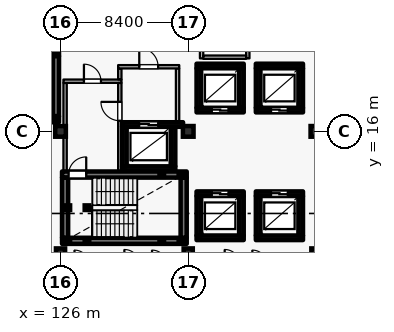
"""IFC4 building model, lengths in metres.
Left out: names, types, materials, properties, quantities, classifications, styles, units other than length and angle.
Written with IfcOpenShell. Run it as: python <this file> out.ifc"""

import sys

from ifc_helpers import new_model, si_unit, direction, frame, frame_2d, origin, origin_2d, place, context, subcontext, project, spatial, rectangle, hollow_rectangle, extrude, element, fill, save


model = new_model("IFC4")
c1 = context("Model", 3, precision=1e-05, world=origin(), true_north=direction((0.0, 1.0)))
c2 = subcontext(c1, "Body", "Model", "MODEL_VIEW")
j1 = project(units=[si_unit("LENGTHUNIT", "METRE"), si_unit("PLANEANGLEUNIT", "RADIAN")], contexts=[c1])
p1 = place(None, origin())
s1 = spatial("IfcSite", under=j1, at=p1, CompositionType="ELEMENT")
p2 = place(p1, origin())
s2 = spatial("IfcBuilding", under=s1, at=p2, CompositionType="ELEMENT")
p3 = place(p2, frame((0.0, 0.0, 32.4)))
s3 = spatial("IfcBuildingStorey", under=s2, at=p3, CompositionType="ELEMENT", Elevation=32.4)
for number, where, z_axis, x_axis in (
    (1, (126.0, 16.0, 0.0), (0.0, 0.0, 1.0), (1.0, 0.0, 0.0)),
    (2, (134.4, 16.0, 0.0), (0.0, 0.0, 1.0), (1.0, 0.0, 0.0)),
    (3, (142.8, 16.0, 0.0), (0.0, 0.0, 1.0), (1.0, 0.0, 0.0)),
):
    element("IfcColumn", number, at=place(p3, frame(where, z_axis=z_axis, x_axis=x_axis)), inside=s3, PredefinedType="COLUMN", context=c2, shape_type="SweptSolid", body=[
        extrude(rectangle(XDim=0.7, YDim=0.7, at=origin_2d()), origin(), (0.0, 0.0, 1.0), 3.6),
    ])
for number, where, z_axis, x_axis in (
    (4, (126.0, 8.0, 0.0), (0.0, 0.0, 1.0), (1.0, 0.0, 0.0)),
    (5, (134.4, 8.0, 0.0), (0.0, 0.0, 1.0), (1.0, 0.0, 0.0)),
    (6, (142.8, 8.0, 0.0), (0.0, 0.0, 1.0), (1.0, 0.0, 0.0)),
):
    element("IfcColumn", number, at=place(p3, frame(where, z_axis=z_axis, x_axis=x_axis)), inside=s3, PredefinedType="COLUMN", context=c2, shape_type="SweptSolid", body=[
        extrude(rectangle(XDim=0.6, YDim=0.6, at=origin_2d()), origin(), (0.0, 0.0, 1.0), 3.6),
    ])
p4 = place(p3, frame((134.95, 17.4, 0.0), z_axis=(0.0, 0.0, 1.0), x_axis=(1.0, 0.0, 0.0)))
e7 = element("IfcWall", 7, at=p4, inside=s3, PredefinedType="SHEAR", context=c2, shape_type="SweptSolid", body=[
    extrude(rectangle(XDim=3.1, YDim=0.3, at=frame_2d((1.55, 0.0))), origin(), (0.0, 0.0, 1.0), 3.335),
])
p5 = place(p4, frame((1.0, 0.0, 0.0)))
e8 = element("IfcOpeningElement", 8, at=p5, cuts=e7, PredefinedType="OPENING", context=c2, shape_type="SweptSolid", body=[
    extrude(rectangle(XDim=1.1, YDim=2.2, at=frame_2d((0.55, 1.1))), frame((0.0, 0.16, 0.0), z_axis=(0.0, -1.0, 0.0), x_axis=(1.0, 0.0, 0.0)), (0.0, 0.0, 1.0), 0.32),
])
p6 = place(p3, frame((137.9, 17.555, 0.0), z_axis=(0.0, 0.0, 1.0), x_axis=(0.0, 1.0, 0.0)))
e9 = element("IfcWall", 9, at=p6, inside=s3, PredefinedType="SHEAR", context=c2, shape_type="SweptSolid", body=[
    extrude(rectangle(XDim=2.59, YDim=0.3, at=frame_2d((1.295, 0.0))), origin(), (0.0, 0.0, 1.0), 3.335),
])
p7 = place(p3, frame((138.05, 20.3, 0.0), z_axis=(0.0, 0.0, 1.0), x_axis=(-1.0, 0.0, 0.0)))
e10 = element("IfcWall", 10, at=p7, inside=s3, PredefinedType="SHEAR", context=c2, shape_type="SweptSolid", body=[
    extrude(rectangle(XDim=3.1, YDim=0.3, at=frame_2d((1.55, 0.0))), origin(), (0.0, 0.0, 1.0), 3.335),
])
p8 = place(p3, frame((135.1, 20.145, 0.0), z_axis=(0.0, 0.0, 1.0), x_axis=(0.0, -1.0, 0.0)))
e11 = element("IfcWall", 11, at=p8, inside=s3, PredefinedType="SHEAR", context=c2, shape_type="SweptSolid", body=[
    extrude(rectangle(XDim=2.59, YDim=0.3, at=frame_2d((1.295, 0.0))), origin(), (0.0, 0.0, 1.0), 3.335),
])
p9 = place(p3, frame((138.85, 17.4, 0.0), z_axis=(0.0, 0.0, 1.0), x_axis=(1.0, 0.0, 0.0)))
e12 = element("IfcWall", 12, at=p9, inside=s3, PredefinedType="SHEAR", context=c2, shape_type="SweptSolid", body=[
    extrude(rectangle(XDim=3.1, YDim=0.3, at=frame_2d((1.55, 0.0))), origin(), (0.0, 0.0, 1.0), 3.335),
])
p10 = place(p9, frame((1.0, 0.0, 0.0)))
e13 = element("IfcOpeningElement", 13, at=p10, cuts=e12, PredefinedType="OPENING", context=c2, shape_type="SweptSolid", body=[
    extrude(rectangle(XDim=1.1, YDim=2.2, at=frame_2d((0.55, 1.1))), frame((0.0, 0.16, 0.0), z_axis=(0.0, -1.0, 0.0), x_axis=(1.0, 0.0, 0.0)), (0.0, 0.0, 1.0), 0.32),
])
p11 = place(p3, frame((141.8, 17.555, 0.0), z_axis=(0.0, 0.0, 1.0), x_axis=(0.0, 1.0, 0.0)))
e14 = element("IfcWall", 14, at=p11, inside=s3, PredefinedType="SHEAR", context=c2, shape_type="SweptSolid", body=[
    extrude(rectangle(XDim=2.59, YDim=0.3, at=frame_2d((1.295, 0.0))), origin(), (0.0, 0.0, 1.0), 3.335),
])
p12 = place(p3, frame((141.95, 20.3, 0.0), z_axis=(0.0, 0.0, 1.0), x_axis=(-1.0, 0.0, 0.0)))
e15 = element("IfcWall", 15, at=p12, inside=s3, PredefinedType="SHEAR", context=c2, shape_type="SweptSolid", body=[
    extrude(rectangle(XDim=3.1, YDim=0.3, at=frame_2d((1.55, 0.0))), origin(), (0.0, 0.0, 1.0), 3.335),
])
p13 = place(p3, frame((139.0, 20.145, 0.0), z_axis=(0.0, 0.0, 1.0), x_axis=(0.0, -1.0, 0.0)))
e16 = element("IfcWall", 16, at=p13, inside=s3, PredefinedType="SHEAR", context=c2, shape_type="SweptSolid", body=[
    extrude(rectangle(XDim=2.59, YDim=0.3, at=frame_2d((1.295, 0.0))), origin(), (0.0, 0.0, 1.0), 3.335),
])
p14 = place(p3, frame((134.95, 9.0, 0.0), z_axis=(0.0, 0.0, 1.0), x_axis=(1.0, 0.0, 0.0)))
e17 = element("IfcWall", 17, at=p14, inside=s3, PredefinedType="SHEAR", context=c2, shape_type="SweptSolid", body=[
    extrude(rectangle(XDim=3.1, YDim=0.3, at=frame_2d((1.55, 0.0))), origin(), (0.0, 0.0, 1.0), 3.335),
])
p15 = place(p3, frame((137.9, 9.155, 0.0), z_axis=(0.0, 0.0, 1.0), x_axis=(0.0, 1.0, 0.0)))
e18 = element("IfcWall", 18, at=p15, inside=s3, PredefinedType="SHEAR", context=c2, shape_type="SweptSolid", body=[
    extrude(rectangle(XDim=2.59, YDim=0.3, at=frame_2d((1.295, 0.0))), origin(), (0.0, 0.0, 1.0), 3.335),
])
p16 = place(p3, frame((138.05, 11.9, 0.0), z_axis=(0.0, 0.0, 1.0), x_axis=(-1.0, 0.0, 0.0)))
e19 = element("IfcWall", 19, at=p16, inside=s3, PredefinedType="SHEAR", context=c2, shape_type="SweptSolid", body=[
    extrude(rectangle(XDim=3.1, YDim=0.3, at=frame_2d((1.55, 0.0))), origin(), (0.0, 0.0, 1.0), 3.335),
])
p17 = place(p16, frame((1.0, 0.0, 0.0)))
e20 = element("IfcOpeningElement", 20, at=p17, cuts=e19, PredefinedType="OPENING", context=c2, shape_type="SweptSolid", body=[
    extrude(rectangle(XDim=1.1, YDim=2.2, at=frame_2d((0.55, 1.1))), frame((0.0, 0.16, 0.0), z_axis=(0.0, -1.0, 0.0), x_axis=(1.0, 0.0, 0.0)), (0.0, 0.0, 1.0), 0.32),
])
p18 = place(p3, frame((135.1, 11.745, 0.0), z_axis=(0.0, 0.0, 1.0), x_axis=(0.0, -1.0, 0.0)))
e21 = element("IfcWall", 21, at=p18, inside=s3, PredefinedType="SHEAR", context=c2, shape_type="SweptSolid", body=[
    extrude(rectangle(XDim=2.59, YDim=0.3, at=frame_2d((1.295, 0.0))), origin(), (0.0, 0.0, 1.0), 3.335),
])
p19 = place(p3, frame((138.85, 9.0, 0.0), z_axis=(0.0, 0.0, 1.0), x_axis=(1.0, 0.0, 0.0)))
e22 = element("IfcWall", 22, at=p19, inside=s3, PredefinedType="SHEAR", context=c2, shape_type="SweptSolid", body=[
    extrude(rectangle(XDim=3.1, YDim=0.3, at=frame_2d((1.55, 0.0))), origin(), (0.0, 0.0, 1.0), 3.335),
])
p20 = place(p3, frame((141.8, 9.155, 0.0), z_axis=(0.0, 0.0, 1.0), x_axis=(0.0, 1.0, 0.0)))
e23 = element("IfcWall", 23, at=p20, inside=s3, PredefinedType="SHEAR", context=c2, shape_type="SweptSolid", body=[
    extrude(rectangle(XDim=2.59, YDim=0.3, at=frame_2d((1.295, 0.0))), origin(), (0.0, 0.0, 1.0), 3.335),
])
p21 = place(p3, frame((141.95, 11.9, 0.0), z_axis=(0.0, 0.0, 1.0), x_axis=(-1.0, 0.0, 0.0)))
e24 = element("IfcWall", 24, at=p21, inside=s3, PredefinedType="SHEAR", context=c2, shape_type="SweptSolid", body=[
    extrude(rectangle(XDim=3.1, YDim=0.3, at=frame_2d((1.55, 0.0))), origin(), (0.0, 0.0, 1.0), 3.335),
])
p22 = place(p21, frame((1.0, 0.0, 0.0)))
e25 = element("IfcOpeningElement", 25, at=p22, cuts=e24, PredefinedType="OPENING", context=c2, shape_type="SweptSolid", body=[
    extrude(rectangle(XDim=1.1, YDim=2.2, at=frame_2d((0.55, 1.1))), frame((0.0, 0.16, 0.0), z_axis=(0.0, -1.0, 0.0), x_axis=(1.0, 0.0, 0.0)), (0.0, 0.0, 1.0), 0.32),
])
p23 = place(p3, frame((139.0, 11.745, 0.0), z_axis=(0.0, 0.0, 1.0), x_axis=(0.0, -1.0, 0.0)))
e26 = element("IfcWall", 26, at=p23, inside=s3, PredefinedType="SHEAR", context=c2, shape_type="SweptSolid", body=[
    extrude(rectangle(XDim=2.59, YDim=0.3, at=frame_2d((1.295, 0.0))), origin(), (0.0, 0.0, 1.0), 3.335),
])
p24 = place(p3, frame((130.05, 13.55, 0.0), z_axis=(0.0, 0.0, 1.0), x_axis=(1.0, 0.0, 0.0)))
e27 = element("IfcWall", 27, at=p24, inside=s3, PredefinedType="SHEAR", context=c2, shape_type="SweptSolid", body=[
    extrude(rectangle(XDim=3.5, YDim=0.3, at=frame_2d((1.75, 0.0))), origin(), (0.0, 0.0, 1.0), 3.335),
])
p25 = place(p3, frame((133.4, 13.705, 0.0), z_axis=(0.0, 0.0, 1.0), x_axis=(0.0, 1.0, 0.0)))
e28 = element("IfcWall", 28, at=p25, inside=s3, PredefinedType="SHEAR", context=c2, shape_type="SweptSolid", body=[
    extrude(rectangle(XDim=2.59, YDim=0.3, at=frame_2d((1.295, 0.0))), origin(), (0.0, 0.0, 1.0), 3.335),
])
p26 = place(p3, frame((134.06, 16.45, 0.0), z_axis=(0.0, 0.0, 1.0), x_axis=(-1.0, 0.0, 0.0)))
e29 = element("IfcWall", 29, at=p26, inside=s3, PredefinedType="SHEAR", context=c2, shape_type="SweptSolid", body=[
    extrude(rectangle(XDim=4.01, YDim=0.3, at=frame_2d((2.005, 0.0))), origin(), (0.0, 0.0, 1.0), 3.335),
])
p27 = place(p26, frame((1.635, 0.0, 0.0)))
e30 = element("IfcOpeningElement", 30, at=p27, cuts=e29, PredefinedType="OPENING", context=c2, shape_type="SweptSolid", body=[
    extrude(rectangle(XDim=1.25, YDim=2.25, at=frame_2d((0.625, 1.125))), frame((0.0, 0.16, 0.0), z_axis=(0.0, -1.0, 0.0), x_axis=(1.0, 0.0, 0.0)), (0.0, 0.0, 1.0), 0.32),
])
p28 = place(p3, frame((130.2, 16.295, 0.0), z_axis=(0.0, 0.0, 1.0), x_axis=(0.0, -1.0, 0.0)))
e31 = element("IfcWall", 31, at=p28, inside=s3, PredefinedType="SHEAR", context=c2, shape_type="SweptSolid", body=[
    extrude(rectangle(XDim=2.59, YDim=0.3, at=frame_2d((1.295, 0.0))), origin(), (0.0, 0.0, 1.0), 3.335),
])
p29 = place(p3, frame((126.1, 8.8, 0.0), z_axis=(0.0, 0.0, 1.0), x_axis=(1.0, 0.0, 0.0)))
e32 = element("IfcWall", 32, at=p29, inside=s3, PredefinedType="SHEAR", context=c2, shape_type="SweptSolid", body=[
    extrude(rectangle(XDim=8.2, YDim=0.4, at=frame_2d((4.1, 0.0))), origin(), (0.0, 0.0, 1.0), 3.335),
])
p30 = place(p3, frame((134.1, 9.005, 0.0), z_axis=(0.0, 0.0, 1.0), x_axis=(0.0, 1.0, 0.0)))
e33 = element("IfcWall", 33, at=p30, inside=s3, PredefinedType="SHEAR", context=c2, shape_type="SweptSolid", body=[
    extrude(rectangle(XDim=3.95, YDim=0.4, at=frame_2d((1.975, 0.0))), origin(), (0.0, 0.0, 1.0), 3.335),
])
p31 = place(p3, frame((126.1, 13.16, 0.0), z_axis=(0.0, 0.0, 1.0), x_axis=(1.0, 0.0, 0.0)))
e34 = element("IfcWall", 34, at=p31, inside=s3, PredefinedType="SHEAR", context=c2, shape_type="SweptSolid", body=[
    extrude(rectangle(XDim=8.2, YDim=0.4, at=frame_2d((4.1, 0.0))), origin(), (0.0, 0.0, 1.0), 3.335),
])
p32 = place(p31, frame((0.43, 0.0, 0.0)))
e35 = element("IfcOpeningElement", 35, at=p32, cuts=e34, PredefinedType="OPENING", context=c2, shape_type="SweptSolid", body=[
    extrude(rectangle(XDim=1.16, YDim=2.2, at=frame_2d((0.58, 1.1))), frame((0.0, 0.21, 0.0), z_axis=(0.0, -1.0, 0.0), x_axis=(1.0, 0.0, 0.0)), (0.0, 0.0, 1.0), 0.42),
])
p33 = place(p3, frame((126.3, 9.005, 0.0), z_axis=(0.0, 0.0, 1.0), x_axis=(0.0, 1.0, 0.0)))
e36 = element("IfcWall", 36, at=p33, inside=s3, PredefinedType="SHEAR", context=c2, shape_type="SweptSolid", body=[
    extrude(rectangle(XDim=3.95, YDim=0.4, at=frame_2d((1.975, 0.0))), origin(), (0.0, 0.0, 1.0), 3.335),
])
p34 = place(p3, frame((126.3, 13.365, 0.0), z_axis=(0.0, 0.0, 1.0), x_axis=(0.0, 1.0, 0.0)))
e37 = element("IfcWall", 37, at=p34, inside=s3, PredefinedType="PARTITIONING", context=c2, shape_type="SweptSolid", body=[
    extrude(rectangle(XDim=5.82, YDim=0.22, at=frame_2d((2.91, 0.0))), origin(), (0.0, 0.0, 1.0), 3.335),
])
p35 = place(p3, frame((126.19, 19.3, 0.0), z_axis=(0.0, 0.0, 1.0), x_axis=(1.0, 0.0, 0.0)))
e38 = element("IfcWall", 38, at=p35, inside=s3, PredefinedType="PARTITIONING", context=c2, shape_type="SweptSolid", body=[
    extrude(rectangle(XDim=3.82, YDim=0.22, at=frame_2d((1.91, 0.0))), origin(), (0.0, 0.0, 1.0), 3.335),
])
p36 = place(p35, frame((1.35, 0.0, 0.0)))
e39 = element("IfcOpeningElement", 39, at=p36, cuts=e38, PredefinedType="OPENING", context=c2, shape_type="SweptSolid", body=[
    extrude(rectangle(XDim=1.12, YDim=2.2, at=frame_2d((0.56, 1.1))), frame((0.0, 0.12, 0.0), z_axis=(0.0, -1.0, 0.0), x_axis=(1.0, 0.0, 0.0)), (0.0, 0.0, 1.0), 0.24),
])
p37 = place(p3, frame((129.9, 13.365, 0.0), z_axis=(0.0, 0.0, 1.0), x_axis=(0.0, 1.0, 0.0)))
e40 = element("IfcWall", 40, at=p37, inside=s3, PredefinedType="PARTITIONING", context=c2, shape_type="SweptSolid", body=[
    extrude(rectangle(XDim=5.82, YDim=0.22, at=frame_2d((2.91, 0.0))), origin(), (0.0, 0.0, 1.0), 3.335),
])
p38 = place(p37, frame((3.335, 0.0, 0.0)))
e41 = element("IfcOpeningElement", 41, at=p38, cuts=e40, PredefinedType="OPENING", context=c2, shape_type="SweptSolid", body=[
    extrude(rectangle(XDim=1.24, YDim=2.2, at=frame_2d((0.62, 1.1))), frame((0.0, 0.12, 0.0), z_axis=(0.0, -1.0, 0.0), x_axis=(1.0, 0.0, 0.0)), (0.0, 0.0, 1.0), 0.24),
])
p39 = place(p3, frame((129.9, 19.415, 0.0), z_axis=(0.0, 0.0, 1.0), x_axis=(0.0, 1.0, 0.0)))
e42 = element("IfcWall", 42, at=p39, inside=s3, PredefinedType="PARTITIONING", context=c2, shape_type="SweptSolid", body=[
    extrude(rectangle(XDim=0.72, YDim=0.22, at=frame_2d((0.36, 0.0))), origin(), (0.0, 0.0, 1.0), 3.335),
])
p40 = place(p3, frame((133.7, 16.605, 0.0), z_axis=(0.0, 0.0, 1.0), x_axis=(0.0, 1.0, 0.0)))
e43 = element("IfcWall", 43, at=p40, inside=s3, PredefinedType="PARTITIONING", context=c2, shape_type="SweptSolid", body=[
    extrude(rectangle(XDim=3.53, YDim=0.22, at=frame_2d((1.765, 0.0))), origin(), (0.0, 0.0, 1.0), 3.335),
])
p41 = place(p3, frame((129.79, 20.25, 0.0), z_axis=(0.0, 0.0, 1.0), x_axis=(1.0, 0.0, 0.0)))
e44 = element("IfcWall", 44, at=p41, inside=s3, PredefinedType="PARTITIONING", context=c2, shape_type="SweptSolid", body=[
    extrude(rectangle(XDim=4.02, YDim=0.22, at=frame_2d((2.01, 0.0))), origin(), (0.0, 0.0, 1.0), 3.335),
])
p42 = place(p41, frame((1.39, 0.0, 0.0)))
e45 = element("IfcOpeningElement", 45, at=p42, cuts=e44, PredefinedType="OPENING", context=c2, shape_type="SweptSolid", body=[
    extrude(rectangle(XDim=1.24, YDim=2.2, at=frame_2d((0.62, 1.1))), frame((0.0, 0.12, 0.0), z_axis=(0.0, -1.0, 0.0), x_axis=(1.0, 0.0, 0.0)), (0.0, 0.0, 1.0), 0.24),
])
for number, where, z_axis, x_axis in (
    (46, (126.48, 8.8, 0.0), (0.0, 0.0, 1.0), (1.0, 0.0, 0.0)),
    (47, (126.48, 10.98, 0.0), (0.0, 0.0, 1.0), (1.0, 0.0, 0.0)),
    (48, (127.74, 8.8, 0.0), (0.0, 0.0, 1.0), (1.0, 0.0, 0.0)),
    (49, (127.74, 10.98, 0.0), (0.0, 0.0, 1.0), (1.0, 0.0, 0.0)),
):
    element("IfcColumn", number, at=place(p3, frame(where, z_axis=z_axis, x_axis=x_axis)), inside=s3, PredefinedType="COLUMN", context=c2, shape_type="SweptSolid", body=[
        extrude(hollow_rectangle(XDim=0.3, YDim=0.3, WallThickness=0.012, at=origin_2d()), origin(), (0.0, 0.0, 1.0), 3.42),
    ])
for number, where, z_axis, x_axis in (
    (50, (132.66, 8.8, -1.8), (0.0, 0.0, 1.0), (1.0, 0.0, 0.0)),
    (51, (132.66, 13.16, -1.8), (0.0, 0.0, 1.0), (1.0, 0.0, 0.0)),
    (52, (133.92, 8.8, -1.8), (0.0, 0.0, 1.0), (1.0, 0.0, 0.0)),
    (53, (133.92, 13.16, -1.8), (0.0, 0.0, 1.0), (1.0, 0.0, 0.0)),
):
    element("IfcColumn", number, at=place(p3, frame(where, z_axis=z_axis, x_axis=x_axis)), inside=s3, PredefinedType="COLUMN", context=c2, shape_type="SweptSolid", body=[
        extrude(hollow_rectangle(XDim=0.3, YDim=0.3, WallThickness=0.012, at=origin_2d()), origin(), (0.0, 0.0, 1.0), 3.42),
    ])
p43 = place(p3, frame((117.75, 16.8, 0.0), z_axis=(0.0, 0.0, 1.0), x_axis=(1.0, 0.0, 0.0)))
e54 = element("IfcWall", 54, at=p43, inside=s3, PredefinedType="SHEAR", context=c2, shape_type="SweptSolid", body=[
    extrude(rectangle(XDim=8.15, YDim=0.4, at=frame_2d((4.075, 0.0))), origin(), (0.0, 0.0, 1.0), 3.335),
])
p44 = place(p3, frame((125.7, 17.005, 0.0), z_axis=(0.0, 0.0, 1.0), x_axis=(0.0, 1.0, 0.0)))
e55 = element("IfcWall", 55, at=p44, inside=s3, PredefinedType="SHEAR", context=c2, shape_type="SweptSolid", body=[
    extrude(rectangle(XDim=3.95, YDim=0.4, at=frame_2d((1.975, 0.0))), origin(), (0.0, 0.0, 1.0), 3.335),
])
p45 = place(p3, frame((117.75, 21.16, 0.0), z_axis=(0.0, 0.0, 1.0), x_axis=(1.0, 0.0, 0.0)))
e56 = element("IfcWall", 56, at=p45, inside=s3, PredefinedType="SHEAR", context=c2, shape_type="SweptSolid", body=[
    extrude(rectangle(XDim=8.15, YDim=0.4, at=frame_2d((4.075, 0.0))), origin(), (0.0, 0.0, 1.0), 3.335),
])
p46 = place(p45, frame((0.38, 0.0, 0.0)))
e57 = element("IfcOpeningElement", 57, at=p46, cuts=e56, PredefinedType="OPENING", context=c2, shape_type="SweptSolid", body=[
    extrude(rectangle(XDim=1.16, YDim=2.2, at=frame_2d((0.58, 1.1))), frame((0.0, 0.21, 0.0), z_axis=(0.0, -1.0, 0.0), x_axis=(1.0, 0.0, 0.0)), (0.0, 0.0, 1.0), 0.42),
])
for number, where, z_axis, x_axis in (
    (58, (125.52, 16.8, -1.8), (0.0, 0.0, 1.0), (1.0, 0.0, 0.0)),
    (59, (125.52, 21.16, -1.8), (0.0, 0.0, 1.0), (1.0, 0.0, 0.0)),
):
    element("IfcColumn", number, at=place(p3, frame(where, z_axis=z_axis, x_axis=x_axis)), inside=s3, PredefinedType="COLUMN", context=c2, shape_type="SweptSolid", body=[
        extrude(hollow_rectangle(XDim=0.3, YDim=0.3, WallThickness=0.012, at=origin_2d()), origin(), (0.0, 0.0, 1.0), 3.42),
    ])
for number, where, z_axis, x_axis in (
    (60, (135.28, 20.8, 0.0), (0.0, 0.0, 1.0), (0.0, 1.0, 0.0)),
    (61, (138.32, 20.8, 0.0), (0.0, 0.0, 1.0), (0.0, 1.0, 0.0)),
):
    element("IfcWall", number, at=place(p3, frame(where, z_axis=z_axis, x_axis=x_axis)), inside=s3, PredefinedType="PARTITIONING", context=c2, shape_type="SweptSolid", body=[
        extrude(rectangle(XDim=2.748, YDim=0.22, at=frame_2d((1.374, 0.0))), origin(), (0.0, 0.0, 1.0), 3.335),
    ])
p47 = place(p3, frame((135.39, 20.88, 0.0), z_axis=(0.0, 0.0, 1.0), x_axis=(1.0, 0.0, 0.0)))
e62 = element("IfcWall", 62, at=p47, inside=s3, PredefinedType="PARTITIONING", context=c2, shape_type="SweptSolid", body=[
    extrude(rectangle(XDim=2.82, YDim=0.22, at=frame_2d((1.41, 0.0))), origin(), (0.0, 0.0, 1.0), 3.335),
])
p48 = place(p5, origin())
e63 = element("IfcDoor", 63, at=p48, inside=s3, OperationType="DOUBLE_DOOR_SLIDING", PredefinedType="DOOR", context=c2, shape_type="SweptSolid", body=[
    extrude(rectangle(XDim=1.1, YDim=2.2, at=frame_2d((0.55, 1.1))), frame((0.0, 0.025, 0.0), z_axis=(0.0, -1.0, 0.0), x_axis=(1.0, 0.0, 0.0)), (0.0, 0.0, 1.0), 0.05),
])
fill(e8, e63)
p49 = place(p10, origin())
e64 = element("IfcDoor", 64, at=p49, inside=s3, OperationType="DOUBLE_DOOR_SLIDING", PredefinedType="DOOR", context=c2, shape_type="SweptSolid", body=[
    extrude(rectangle(XDim=1.1, YDim=2.2, at=frame_2d((0.55, 1.1))), frame((0.0, 0.025, 0.0), z_axis=(0.0, -1.0, 0.0), x_axis=(1.0, 0.0, 0.0)), (0.0, 0.0, 1.0), 0.05),
])
fill(e13, e64)
p50 = place(p17, origin())
e65 = element("IfcDoor", 65, at=p50, inside=s3, OperationType="DOUBLE_DOOR_SLIDING", PredefinedType="DOOR", context=c2, shape_type="SweptSolid", body=[
    extrude(rectangle(XDim=1.1, YDim=2.2, at=frame_2d((0.55, 1.1))), frame((0.0, 0.025, 0.0), z_axis=(0.0, -1.0, 0.0), x_axis=(1.0, 0.0, 0.0)), (0.0, 0.0, 1.0), 0.05),
])
fill(e20, e65)
p51 = place(p22, origin())
e66 = element("IfcDoor", 66, at=p51, inside=s3, OperationType="DOUBLE_DOOR_SLIDING", PredefinedType="DOOR", context=c2, shape_type="SweptSolid", body=[
    extrude(rectangle(XDim=1.1, YDim=2.2, at=frame_2d((0.55, 1.1))), frame((0.0, 0.025, 0.0), z_axis=(0.0, -1.0, 0.0), x_axis=(1.0, 0.0, 0.0)), (0.0, 0.0, 1.0), 0.05),
])
fill(e25, e66)
p52 = place(p27, origin())
e67 = element("IfcDoor", 67, at=p52, inside=s3, OperationType="DOUBLE_DOOR_SLIDING", PredefinedType="DOOR", context=c2, shape_type="SweptSolid", body=[
    extrude(rectangle(XDim=1.25, YDim=2.25, at=frame_2d((0.625, 1.125))), frame((0.0, 0.025, 0.0), z_axis=(0.0, -1.0, 0.0), x_axis=(1.0, 0.0, 0.0)), (0.0, 0.0, 1.0), 0.05),
])
fill(e30, e67)
p53 = place(p32, origin())
e68 = element("IfcDoor", 68, at=p53, inside=s3, OperationType="SINGLE_SWING_RIGHT", PredefinedType="DOOR", context=c2, shape_type="SweptSolid", body=[
    extrude(rectangle(XDim=1.16, YDim=2.2, at=frame_2d((0.58, 1.1))), frame((0.0, 0.025, 0.0), z_axis=(0.0, -1.0, 0.0), x_axis=(1.0, 0.0, 0.0)), (0.0, 0.0, 1.0), 0.05),
])
fill(e35, e68)
p54 = place(p36, origin())
e69 = element("IfcDoor", 69, at=p54, inside=s3, OperationType="SINGLE_SWING_LEFT", PredefinedType="DOOR", context=c2, shape_type="SweptSolid", body=[
    extrude(rectangle(XDim=1.12, YDim=2.2, at=frame_2d((0.56, 1.1))), frame((0.0, 0.025, 0.0), z_axis=(0.0, -1.0, 0.0), x_axis=(1.0, 0.0, 0.0)), (0.0, 0.0, 1.0), 0.05),
])
fill(e39, e69)
p55 = place(p38, origin())
e70 = element("IfcDoor", 70, at=p55, inside=s3, OperationType="SINGLE_SWING_RIGHT", PredefinedType="DOOR", context=c2, shape_type="SweptSolid", body=[
    extrude(rectangle(XDim=1.24, YDim=2.2, at=frame_2d((0.62, 1.1))), frame((0.0, 0.025, 0.0), z_axis=(0.0, -1.0, 0.0), x_axis=(1.0, 0.0, 0.0)), (0.0, 0.0, 1.0), 0.05),
])
fill(e41, e70)
p56 = place(p42, origin())
e71 = element("IfcDoor", 71, at=p56, inside=s3, OperationType="SINGLE_SWING_LEFT", PredefinedType="DOOR", context=c2, shape_type="SweptSolid", body=[
    extrude(rectangle(XDim=1.24, YDim=2.2, at=frame_2d((0.62, 1.1))), frame((0.0, 0.025, 0.0), z_axis=(0.0, -1.0, 0.0), x_axis=(1.0, 0.0, 0.0)), (0.0, 0.0, 1.0), 0.05),
])
fill(e45, e71)
save(model, sys.argv[1])
